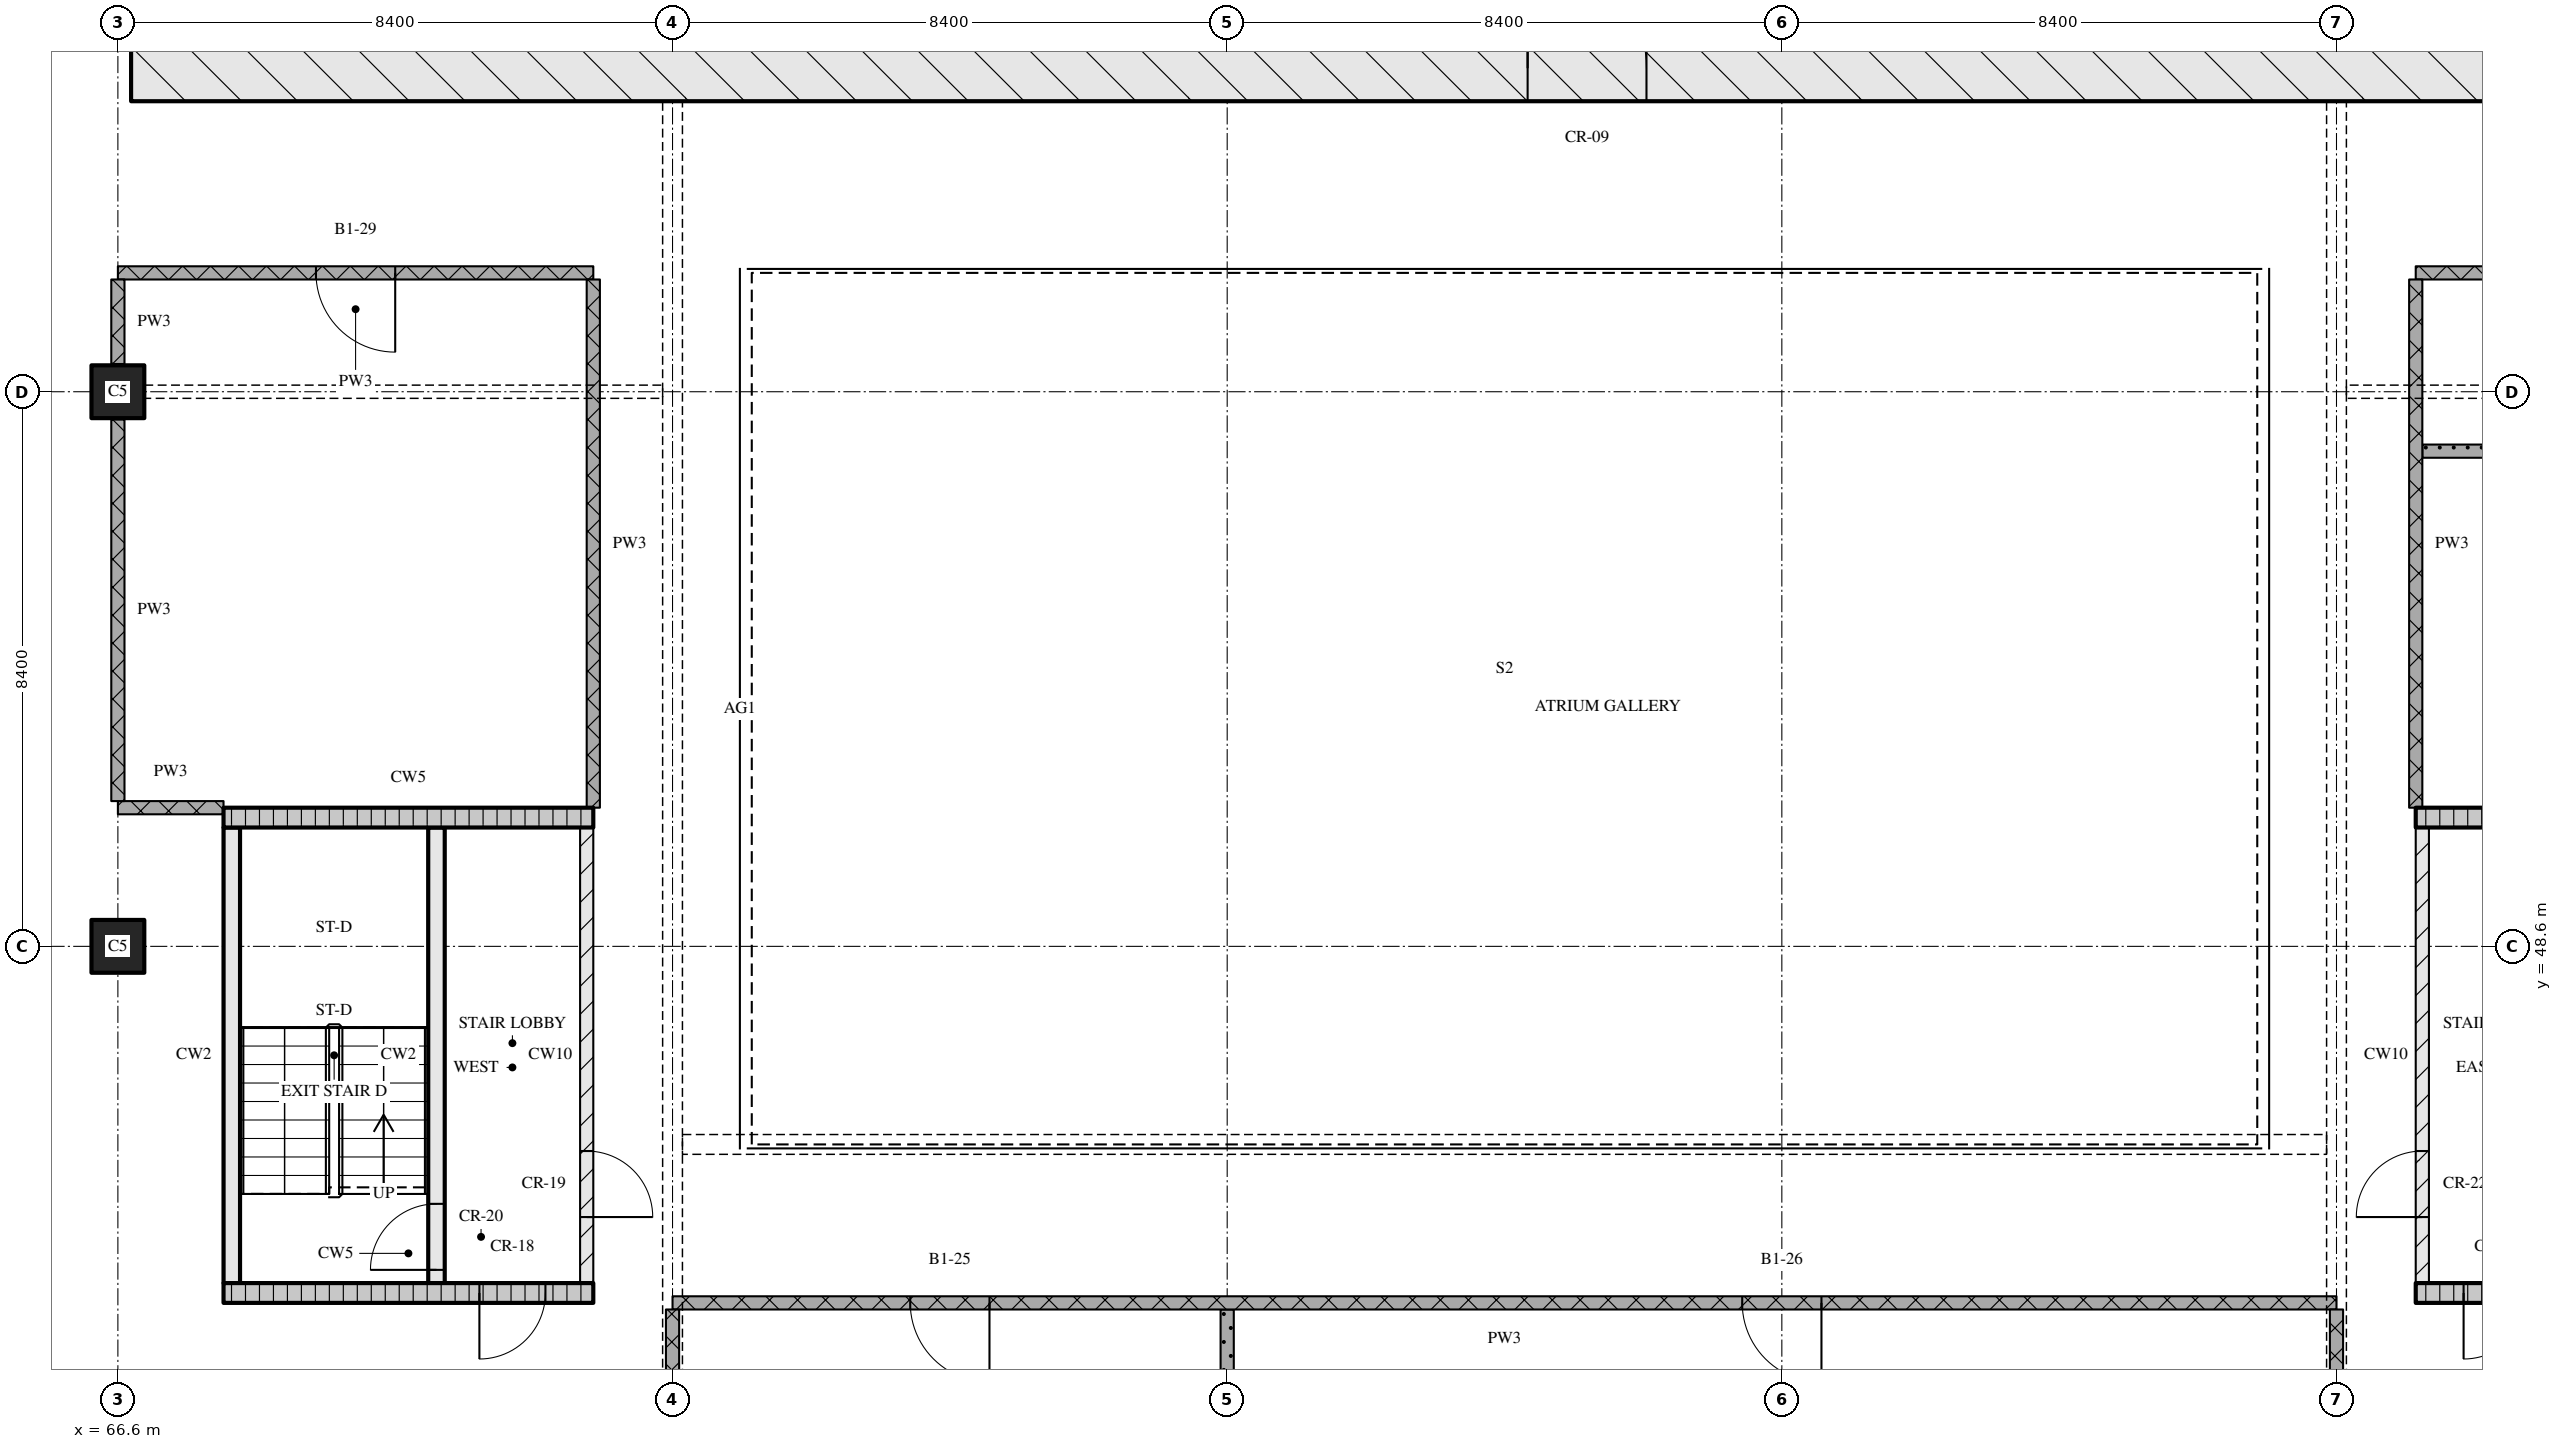
"""IFC4 building model, lengths in metres.
Left out: names, types, materials, properties, quantities, classifications, styles, units other than length and angle.
Written with IfcOpenShell. Run it as: python <this file> out.ifc"""

import sys

from ifc_helpers import new_model, si_unit, direction, frame, frame_2d, origin, origin_2d, place, context, subcontext, project, spatial, rectangle, extrude, element, fill, save


model = new_model("IFC4")
c1 = context("Model", 3, precision=1e-05, world=origin(), true_north=direction((0.0, 1.0)))
c2 = subcontext(c1, "Body", "Model", "MODEL_VIEW")
j1 = project(units=[si_unit("LENGTHUNIT", "METRE"), si_unit("PLANEANGLEUNIT", "RADIAN")], contexts=[c1])
p1 = place(None, origin())
s1 = spatial("IfcSite", under=j1, at=p1, CompositionType="ELEMENT")
p2 = place(p1, origin())
s2 = spatial("IfcBuilding", under=s1, at=p2, CompositionType="ELEMENT")
p3 = place(p2, frame((0.0, 0.0, 95.25)))
s3 = spatial("IfcBuildingStorey", under=s2, at=p3, CompositionType="ELEMENT", Elevation=95.25)
for number, where, z_axis, x_axis in (
    (1, (66.6, 48.6, 0.0), (0.0, 0.0, 1.0), (1.0, 0.0, 0.0)),
    (2, (66.6, 57.0, 0.0), (0.0, 0.0, 1.0), (1.0, 0.0, 0.0)),
):
    element("IfcColumn", number, at=place(p3, frame(where, z_axis=z_axis, x_axis=x_axis)), inside=s3, PredefinedType="COLUMN", context=c2, shape_type="SweptSolid", body=[
        extrude(rectangle(XDim=0.8, YDim=0.8, at=origin_2d()), origin(), (0.0, 0.0, 1.0), 3.6),
    ])
p4 = place(p3, frame((66.8, 61.9, 0.0), z_axis=(0.0, 0.0, 1.0), x_axis=(1.0, 0.0, 0.0)))
e3 = element("IfcWall", 3, at=p4, inside=s3, PredefinedType="SOLIDWALL", context=c2, shape_type="SweptSolid", body=[
    extrude(rectangle(XDim=41.6, YDim=1.0, at=frame_2d((20.8, 0.0))), origin(), (0.0, 0.0, 1.0), 3.32),
])
p5 = place(p4, frame((21.15, 0.0, 0.0)))
e4 = element("IfcOpeningElement", 4, at=p5, cuts=e3, PredefinedType="OPENING", context=c2, shape_type="SweptSolid", body=[
    extrude(rectangle(XDim=1.8, YDim=2.1, at=frame_2d((0.9, 1.05))), frame((0.0, 0.51, 0.0), z_axis=(0.0, -1.0, 0.0), x_axis=(1.0, 0.0, 0.0)), (0.0, 0.0, 1.0), 1.02),
])
p6 = place(p3, frame((68.2, 43.35, 0.0), z_axis=(0.0, 0.0, 1.0), x_axis=(1.0, 0.0, 0.0)))
e5 = element("IfcWall", 5, at=p6, inside=s3, PredefinedType="SOLIDWALL", context=c2, shape_type="SweptSolid", body=[
    extrude(rectangle(XDim=5.6, YDim=0.3, at=frame_2d((2.8, 0.0))), origin(), (0.0, 0.0, 1.0), 3.32),
])
p7 = place(p6, frame((3.875, 0.0, 0.0)))
e6 = element("IfcOpeningElement", 6, at=p7, cuts=e5, PredefinedType="OPENING", context=c2, shape_type="SweptSolid", body=[
    extrude(rectangle(XDim=1.0, YDim=2.1, at=frame_2d((0.5, 1.05))), frame((0.0, 0.16, 0.0), z_axis=(0.0, -1.0, 0.0), x_axis=(1.0, 0.0, 0.0)), (0.0, 0.0, 1.0), 0.32),
])
p8 = place(p3, frame((68.325, 43.5, 0.0), z_axis=(0.0, 0.0, 1.0), x_axis=(0.0, 1.0, 0.0)))
e7 = element("IfcWall", 7, at=p8, inside=s3, PredefinedType="SOLIDWALL", context=c2, shape_type="SweptSolid", body=[
    extrude(rectangle(XDim=6.9, YDim=0.25, at=frame_2d((3.45, 0.0))), origin(), (0.0, 0.0, 1.0), 3.32),
])
p9 = place(p3, frame((71.425, 43.5, 0.0), z_axis=(0.0, 0.0, 1.0), x_axis=(0.0, 1.0, 0.0)))
e8 = element("IfcWall", 8, at=p9, inside=s3, PredefinedType="SOLIDWALL", context=c2, shape_type="SweptSolid", body=[
    extrude(rectangle(XDim=6.9, YDim=0.25, at=frame_2d((3.45, 0.0))), origin(), (0.0, 0.0, 1.0), 3.32),
])
p10 = place(p9, frame((0.2, 0.0, 0.0)))
e9 = element("IfcOpeningElement", 9, at=p10, cuts=e8, PredefinedType="OPENING", context=c2, shape_type="SweptSolid", body=[
    extrude(rectangle(XDim=1.0, YDim=2.1, at=frame_2d((0.5, 1.05))), frame((0.0, 0.135, 0.0), z_axis=(0.0, -1.0, 0.0), x_axis=(1.0, 0.0, 0.0)), (0.0, 0.0, 1.0), 0.27),
])
p11 = place(p3, frame((73.7, 43.5, 0.0), z_axis=(0.0, 0.0, 1.0), x_axis=(0.0, 1.0, 0.0)))
e10 = element("IfcWall", 10, at=p11, inside=s3, PredefinedType="PARTITIONING", context=c2, shape_type="SweptSolid", body=[
    extrude(rectangle(XDim=6.9, YDim=0.2, at=frame_2d((3.45, 0.0))), origin(), (0.0, 0.0, 1.0), 3.32),
])
p12 = place(p11, frame((1.0, 0.0, 0.0)))
e11 = element("IfcOpeningElement", 11, at=p12, cuts=e10, PredefinedType="OPENING", context=c2, shape_type="SweptSolid", body=[
    extrude(rectangle(XDim=1.0, YDim=2.1, at=frame_2d((0.5, 1.05))), frame((0.0, 0.11, 0.0), z_axis=(0.0, -1.0, 0.0), x_axis=(1.0, 0.0, 0.0)), (0.0, 0.0, 1.0), 0.22),
])
p13 = place(p3, frame((68.2, 50.55, 0.0), z_axis=(0.0, 0.0, 1.0), x_axis=(1.0, 0.0, 0.0)))
e12 = element("IfcWall", 12, at=p13, inside=s3, PredefinedType="SOLIDWALL", context=c2, shape_type="SweptSolid", body=[
    extrude(rectangle(XDim=5.6, YDim=0.3, at=frame_2d((2.8, 0.0))), origin(), (0.0, 0.0, 1.0), 3.32),
])
p14 = place(p3, frame((101.4, 43.35, 0.0), z_axis=(0.0, 0.0, 1.0), x_axis=(1.0, 0.0, 0.0)))
e13 = element("IfcWall", 13, at=p14, inside=s3, PredefinedType="SOLIDWALL", context=c2, shape_type="SweptSolid", body=[
    extrude(rectangle(XDim=5.6, YDim=0.3, at=frame_2d((2.8, 0.0))), origin(), (0.0, 0.0, 1.0), 3.32),
])
p15 = place(p14, frame((0.725, 0.0, 0.0)))
e14 = element("IfcOpeningElement", 14, at=p15, cuts=e13, PredefinedType="OPENING", context=c2, shape_type="SweptSolid", body=[
    extrude(rectangle(XDim=1.0, YDim=2.1, at=frame_2d((0.5, 1.05))), frame((0.0, 0.16, 0.0), z_axis=(0.0, -1.0, 0.0), x_axis=(1.0, 0.0, 0.0)), (0.0, 0.0, 1.0), 0.32),
])
p16 = place(p3, frame((101.5, 43.5, 0.0), z_axis=(0.0, 0.0, 1.0), x_axis=(0.0, 1.0, 0.0)))
e15 = element("IfcWall", 15, at=p16, inside=s3, PredefinedType="PARTITIONING", context=c2, shape_type="SweptSolid", body=[
    extrude(rectangle(XDim=6.9, YDim=0.2, at=frame_2d((3.45, 0.0))), origin(), (0.0, 0.0, 1.0), 3.32),
])
p17 = place(p16, frame((1.0, 0.0, 0.0)))
e16 = element("IfcOpeningElement", 16, at=p17, cuts=e15, PredefinedType="OPENING", context=c2, shape_type="SweptSolid", body=[
    extrude(rectangle(XDim=1.0, YDim=2.1, at=frame_2d((0.5, 1.05))), frame((0.0, 0.11, 0.0), z_axis=(0.0, -1.0, 0.0), x_axis=(1.0, 0.0, 0.0)), (0.0, 0.0, 1.0), 0.22),
])
p18 = place(p3, frame((101.4, 50.55, 0.0), z_axis=(0.0, 0.0, 1.0), x_axis=(1.0, 0.0, 0.0)))
e17 = element("IfcWall", 17, at=p18, inside=s3, PredefinedType="SOLIDWALL", context=c2, shape_type="SweptSolid", body=[
    extrude(rectangle(XDim=5.6, YDim=0.3, at=frame_2d((2.8, 0.0))), origin(), (0.0, 0.0, 1.0), 3.32),
])
p19 = place(p3, frame((100.2, 43.2, 0.0), z_axis=(0.0, 0.0, 1.0), x_axis=(-1.0, 0.0, 0.0)))
e18 = element("IfcWall", 18, at=p19, inside=s3, PredefinedType="PARTITIONING", context=c2, shape_type="SweptSolid", body=[
    extrude(rectangle(XDim=25.2, YDim=0.2, at=frame_2d((12.6, 0.0))), origin(), (0.0, 0.0, 1.0), 3.32),
])
p20 = place(p19, frame((7.8, 0.0, 0.0)))
e19 = element("IfcOpeningElement", 19, at=p20, cuts=e18, PredefinedType="OPENING", context=c2, shape_type="SweptSolid", body=[
    extrude(rectangle(XDim=1.2, YDim=2.1, at=frame_2d((0.6, 1.05))), frame((0.0, 0.11, 0.0), z_axis=(0.0, -1.0, 0.0), x_axis=(1.0, 0.0, 0.0)), (0.0, 0.0, 1.0), 0.22),
])
p21 = place(p19, frame((20.4, 0.0, 0.0)))
e20 = element("IfcOpeningElement", 20, at=p21, cuts=e18, PredefinedType="OPENING", context=c2, shape_type="SweptSolid", body=[
    extrude(rectangle(XDim=1.2, YDim=2.1, at=frame_2d((0.6, 1.05))), frame((0.0, 0.11, 0.0), z_axis=(0.0, -1.0, 0.0), x_axis=(1.0, 0.0, 0.0)), (0.0, 0.0, 1.0), 0.22),
])
p22 = place(p3, frame((66.6, 50.7, 0.0), z_axis=(0.0, 0.0, 1.0), x_axis=(1.0, 0.0, 0.0)))
e21 = element("IfcWall", 21, at=p22, inside=s3, PredefinedType="PARTITIONING", context=c2, shape_type="SweptSolid", body=[
    extrude(rectangle(XDim=1.6, YDim=0.2, at=frame_2d((0.8, 0.0))), origin(), (0.0, 0.0, 1.0), 3.32),
])
p23 = place(p3, frame((101.5, 56.1, 0.0), z_axis=(0.0, 0.0, 1.0), x_axis=(1.0, 0.0, 0.0)))
e22 = element("IfcWall", 22, at=p23, inside=s3, PredefinedType="PARTITIONING", context=c2, shape_type="SweptSolid", body=[
    extrude(rectangle(XDim=7.0, YDim=0.2, at=frame_2d((3.5, 0.0))), origin(), (0.0, 0.0, 1.0), 3.32),
])
p24 = place(p3, frame((73.8, 58.8, 0.0), z_axis=(0.0, 0.0, 1.0), x_axis=(-1.0, 0.0, 0.0)))
e23 = element("IfcWall", 23, at=p24, inside=s3, PredefinedType="PARTITIONING", context=c2, shape_type="SweptSolid", body=[
    extrude(rectangle(XDim=7.2, YDim=0.2, at=frame_2d((3.6, 0.0))), origin(), (0.0, 0.0, 1.0), 3.32),
])
p25 = place(p24, frame((3.0, 0.0, 0.0)))
e24 = element("IfcOpeningElement", 24, at=p25, cuts=e23, PredefinedType="OPENING", context=c2, shape_type="SweptSolid", body=[
    extrude(rectangle(XDim=1.2, YDim=2.1, at=frame_2d((0.6, 1.05))), frame((0.0, 0.11, 0.0), z_axis=(0.0, -1.0, 0.0), x_axis=(1.0, 0.0, 0.0)), (0.0, 0.0, 1.0), 0.22),
])
p26 = place(p3, frame((101.4, 58.8, 0.0), z_axis=(0.0, 0.0, 1.0), x_axis=(1.0, 0.0, 0.0)))
e25 = element("IfcWall", 25, at=p26, inside=s3, PredefinedType="PARTITIONING", context=c2, shape_type="SweptSolid", body=[
    extrude(rectangle(XDim=7.2, YDim=0.2, at=frame_2d((3.6, 0.0))), origin(), (0.0, 0.0, 1.0), 3.32),
])
p27 = place(p3, frame((66.6, 56.58, 0.0), z_axis=(0.0, 0.0, 1.0), x_axis=(0.0, -1.0, 0.0)))
e26 = element("IfcWall", 26, at=p27, inside=s3, PredefinedType="PARTITIONING", context=c2, shape_type="SweptSolid", body=[
    extrude(rectangle(XDim=5.78, YDim=0.2, at=frame_2d((2.89, 0.0))), origin(), (0.0, 0.0, 1.0), 3.32),
])
p28 = place(p3, frame((66.6, 58.7, 0.0), z_axis=(0.0, 0.0, 1.0), x_axis=(0.0, -1.0, 0.0)))
e27 = element("IfcWall", 27, at=p28, inside=s3, PredefinedType="PARTITIONING", context=c2, shape_type="SweptSolid", body=[
    extrude(rectangle(XDim=1.28, YDim=0.2, at=frame_2d((0.64, 0.0))), origin(), (0.0, 0.0, 1.0), 3.32),
])
p29 = place(p3, frame((73.8, 58.7, 0.0), z_axis=(0.0, 0.0, 1.0), x_axis=(0.0, -1.0, 0.0)))
e28 = element("IfcWall", 28, at=p29, inside=s3, PredefinedType="PARTITIONING", context=c2, shape_type="SweptSolid", body=[
    extrude(rectangle(XDim=8.0, YDim=0.2, at=frame_2d((4.0, 0.0))), origin(), (0.0, 0.0, 1.0), 3.32),
])
p30 = place(p3, frame((75.0, 43.1, 0.0), z_axis=(0.0, 0.0, 1.0), x_axis=(0.0, -1.0, 0.0)))
e29 = element("IfcWall", 29, at=p30, inside=s3, PredefinedType="PARTITIONING", context=c2, shape_type="SweptSolid", body=[
    extrude(rectangle(XDim=2.2, YDim=0.2, at=frame_2d((1.1, 0.0))), origin(), (0.0, 0.0, 1.0), 2.43),
])
p31 = place(p3, frame((83.4, 43.1, 0.0), z_axis=(0.0, 0.0, 1.0), x_axis=(0.0, -1.0, 0.0)))
e30 = element("IfcWall", 30, at=p31, inside=s3, PredefinedType="PARTITIONING", context=c2, shape_type="SweptSolid", body=[
    extrude(rectangle(XDim=2.48, YDim=0.2, at=frame_2d((1.24, 0.0))), origin(), (0.0, 0.0, 1.0), 3.32),
])
p32 = place(p3, frame((100.2, 43.1, 0.0), z_axis=(0.0, 0.0, 1.0), x_axis=(0.0, -1.0, 0.0)))
e31 = element("IfcWall", 31, at=p32, inside=s3, PredefinedType="PARTITIONING", context=c2, shape_type="SweptSolid", body=[
    extrude(rectangle(XDim=2.2, YDim=0.2, at=frame_2d((1.1, 0.0))), origin(), (0.0, 0.0, 1.0), 2.43),
])
p33 = place(p3, frame((101.4, 58.7, 0.0), z_axis=(0.0, 0.0, 1.0), x_axis=(0.0, -1.0, 0.0)))
e32 = element("IfcWall", 32, at=p33, inside=s3, PredefinedType="PARTITIONING", context=c2, shape_type="SweptSolid", body=[
    extrude(rectangle(XDim=8.0, YDim=0.2, at=frame_2d((4.0, 0.0))), origin(), (0.0, 0.0, 1.0), 3.32),
])
p34 = place(p5, origin())
e33 = element("IfcDoor", 33, at=p34, inside=s3, OperationType="DOUBLE_DOOR_SINGLE_SWING", PredefinedType="DOOR", context=c2, shape_type="SweptSolid", body=[
    extrude(rectangle(XDim=1.8, YDim=2.1, at=frame_2d((0.9, 1.05))), frame((0.0, 0.025, 0.0), z_axis=(0.0, -1.0, 0.0), x_axis=(1.0, 0.0, 0.0)), (0.0, 0.0, 1.0), 0.05),
])
fill(e4, e33)
p35 = place(p7, origin())
e34 = element("IfcDoor", 34, at=p35, inside=s3, OperationType="SINGLE_SWING_RIGHT", PredefinedType="DOOR", context=c2, shape_type="SweptSolid", body=[
    extrude(rectangle(XDim=1.0, YDim=2.1, at=frame_2d((0.5, 1.05))), frame((0.0, 0.025, 0.0), z_axis=(0.0, -1.0, 0.0), x_axis=(1.0, 0.0, 0.0)), (0.0, 0.0, 1.0), 0.05),
])
fill(e6, e34)
p36 = place(p10, origin())
e35 = element("IfcDoor", 35, at=p36, inside=s3, OperationType="SINGLE_SWING_LEFT", PredefinedType="DOOR", context=c2, shape_type="SweptSolid", body=[
    extrude(rectangle(XDim=1.0, YDim=2.1, at=frame_2d((0.5, 1.05))), frame((0.0, 0.025, 0.0), z_axis=(0.0, -1.0, 0.0), x_axis=(1.0, 0.0, 0.0)), (0.0, 0.0, 1.0), 0.05),
])
fill(e9, e35)
p37 = place(p12, origin())
e36 = element("IfcDoor", 36, at=p37, inside=s3, OperationType="SINGLE_SWING_RIGHT", PredefinedType="DOOR", context=c2, shape_type="SweptSolid", body=[
    extrude(rectangle(XDim=1.0, YDim=2.1, at=frame_2d((0.5, 1.05))), frame((0.0, 0.025, 0.0), z_axis=(0.0, -1.0, 0.0), x_axis=(1.0, 0.0, 0.0)), (0.0, 0.0, 1.0), 0.05),
])
fill(e11, e36)
p38 = place(p15, origin())
e37 = element("IfcDoor", 37, at=p38, inside=s3, OperationType="SINGLE_SWING_RIGHT", PredefinedType="DOOR", context=c2, shape_type="SweptSolid", body=[
    extrude(rectangle(XDim=1.0, YDim=2.1, at=frame_2d((0.5, 1.05))), frame((0.0, 0.025, 0.0), z_axis=(0.0, -1.0, 0.0), x_axis=(1.0, 0.0, 0.0)), (0.0, 0.0, 1.0), 0.05),
])
fill(e14, e37)
p39 = place(p17, origin())
e38 = element("IfcDoor", 38, at=p39, inside=s3, OperationType="SINGLE_SWING_LEFT", PredefinedType="DOOR", context=c2, shape_type="SweptSolid", body=[
    extrude(rectangle(XDim=1.0, YDim=2.1, at=frame_2d((0.5, 1.05))), frame((0.0, 0.025, 0.0), z_axis=(0.0, -1.0, 0.0), x_axis=(1.0, 0.0, 0.0)), (0.0, 0.0, 1.0), 0.05),
])
fill(e16, e38)
p40 = place(p20, origin())
e39 = element("IfcDoor", 39, at=p40, inside=s3, OperationType="SINGLE_SWING_LEFT", PredefinedType="DOOR", context=c2, shape_type="SweptSolid", body=[
    extrude(rectangle(XDim=1.2, YDim=2.1, at=frame_2d((0.6, 1.05))), frame((0.0, 0.025, 0.0), z_axis=(0.0, -1.0, 0.0), x_axis=(1.0, 0.0, 0.0)), (0.0, 0.0, 1.0), 0.05),
])
fill(e19, e39)
p41 = place(p21, origin())
e40 = element("IfcDoor", 40, at=p41, inside=s3, OperationType="SINGLE_SWING_LEFT", PredefinedType="DOOR", context=c2, shape_type="SweptSolid", body=[
    extrude(rectangle(XDim=1.2, YDim=2.1, at=frame_2d((0.6, 1.05))), frame((0.0, 0.025, 0.0), z_axis=(0.0, -1.0, 0.0), x_axis=(1.0, 0.0, 0.0)), (0.0, 0.0, 1.0), 0.05),
])
fill(e20, e40)
p42 = place(p25, origin())
e41 = element("IfcDoor", 41, at=p42, inside=s3, OperationType="SINGLE_SWING_LEFT", PredefinedType="DOOR", context=c2, shape_type="SweptSolid", body=[
    extrude(rectangle(XDim=1.2, YDim=2.1, at=frame_2d((0.6, 1.05))), frame((0.0, 0.025, 0.0), z_axis=(0.0, -1.0, 0.0), x_axis=(1.0, 0.0, 0.0)), (0.0, 0.0, 1.0), 0.05),
])
fill(e24, e41)
save(model, sys.argv[1])
